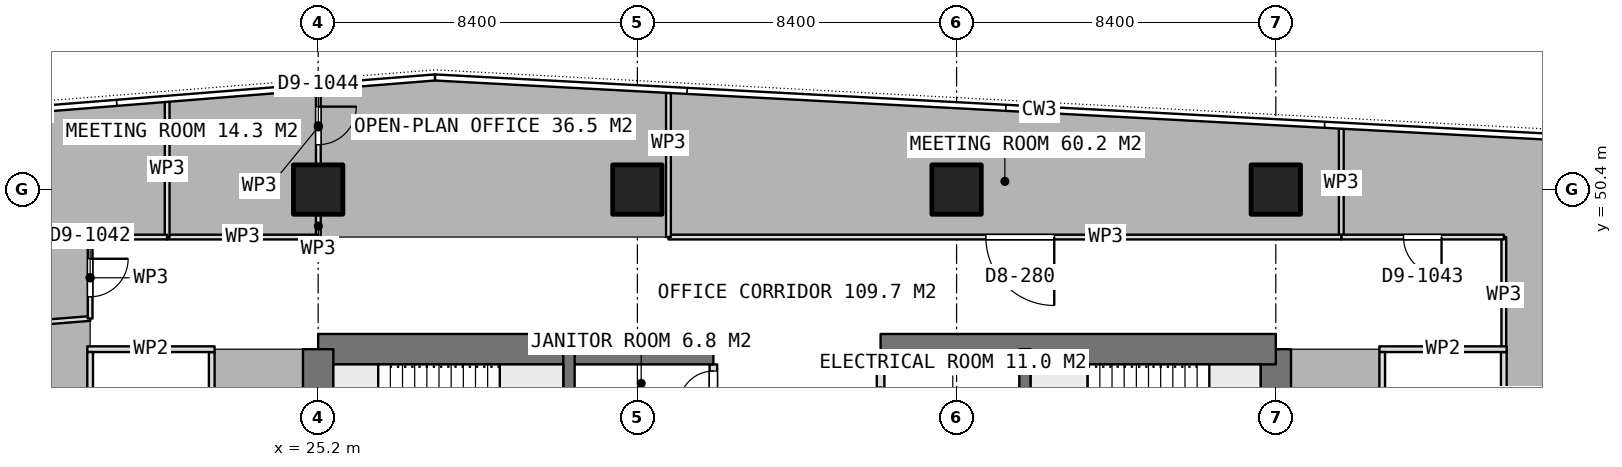
"""IFC4 building model, lengths in metres.
Left out: names, types, materials, properties, quantities, classifications, styles, units other than length and angle.
Written with IfcOpenShell. Run it as: python <this file> out.ifc"""

import sys

from ifc_helpers import new_model, si_unit, direction, frame, frame_2d, origin, origin_2d, place, context, subcontext, project, spatial, rectangle, extrude, element, fill, save


model = new_model("IFC4")
c1 = context("Model", 3, precision=1e-05, world=origin(), true_north=direction((0.0, 1.0)))
c2 = subcontext(c1, "Body", "Model", "MODEL_VIEW")
j1 = project(units=[si_unit("LENGTHUNIT", "METRE"), si_unit("PLANEANGLEUNIT", "RADIAN")], contexts=[c1])
p1 = place(None, origin())
s1 = spatial("IfcSite", under=j1, at=p1, CompositionType="ELEMENT")
p2 = place(p1, origin())
s2 = spatial("IfcBuilding", under=s1, at=p2, CompositionType="ELEMENT")
p3 = place(p2, frame((0.0, 0.0, 280.1)))
s3 = spatial("IfcBuildingStorey", under=s2, at=p3, CompositionType="ELEMENT", Elevation=280.1)
p4 = place(p3, frame((25.2, 46.2, 0.0), z_axis=(0.0, 0.0, 1.0), x_axis=(1.0, 0.0, 0.0)))
e1 = element("IfcWall", 1, at=p4, inside=s3, PredefinedType="SHEAR", context=c2, shape_type="SweptSolid", body=[
    extrude(rectangle(XDim=10.4, YDim=0.8, at=frame_2d((5.2, 0.0))), origin(), (0.0, 0.0, 1.0), 3.75),
])
p5 = place(p3, frame((40.0, 46.2, 0.0), z_axis=(0.0, 0.0, 1.0), x_axis=(1.0, 0.0, 0.0)))
e2 = element("IfcWall", 2, at=p5, inside=s3, PredefinedType="SHEAR", context=c2, shape_type="SweptSolid", body=[
    extrude(rectangle(XDim=10.4, YDim=0.8, at=frame_2d((5.2, 0.0))), origin(), (0.0, 0.0, 1.0), 3.75),
])
p6 = place(p3, frame((25.2, 21.0, 0.0), z_axis=(0.0, 0.0, 1.0), x_axis=(0.0, 1.0, 0.0)))
e3 = element("IfcWall", 3, at=p6, inside=s3, PredefinedType="SHEAR", context=c2, shape_type="SweptSolid", body=[
    extrude(rectangle(XDim=25.2, YDim=0.8, at=frame_2d((12.6, 0.0))), origin(), (0.0, 0.0, 1.0), 3.75),
])
p7 = place(p6, frame((7.8, 0.0, 0.0)))
e4 = element("IfcOpeningElement", 4, at=p7, cuts=e3, PredefinedType="OPENING", context=c2, shape_type="SweptSolid", body=[
    extrude(rectangle(XDim=1.2, YDim=2.1, at=frame_2d((0.6, 1.05))), frame((0.0, 0.41, 0.0), z_axis=(0.0, -1.0, 0.0), x_axis=(1.0, 0.0, 0.0)), (0.0, 0.0, 1.0), 0.82),
])
p8 = place(p6, frame((14.25, 0.0, 0.0)))
e5 = element("IfcOpeningElement", 5, at=p8, cuts=e3, PredefinedType="OPENING", context=c2, shape_type="SweptSolid", body=[
    extrude(rectangle(XDim=0.9, YDim=2.1, at=frame_2d((0.45, 1.05))), frame((0.0, 0.41, 0.0), z_axis=(0.0, -1.0, 0.0), x_axis=(1.0, 0.0, 0.0)), (0.0, 0.0, 1.0), 0.82),
])
p9 = place(p6, frame((16.85, 0.0, 0.0)))
e6 = element("IfcOpeningElement", 6, at=p9, cuts=e3, PredefinedType="OPENING", context=c2, shape_type="SweptSolid", body=[
    extrude(rectangle(XDim=0.9, YDim=2.1, at=frame_2d((0.45, 1.05))), frame((0.0, 0.41, 0.0), z_axis=(0.0, -1.0, 0.0), x_axis=(1.0, 0.0, 0.0)), (0.0, 0.0, 1.0), 0.82),
])
p10 = place(p6, frame((18.95, 0.0, 0.0)))
e7 = element("IfcOpeningElement", 7, at=p10, cuts=e3, PredefinedType="OPENING", context=c2, shape_type="SweptSolid", body=[
    extrude(rectangle(XDim=1.2, YDim=2.1, at=frame_2d((0.6, 1.05))), frame((0.0, 0.41, 0.0), z_axis=(0.0, -1.0, 0.0), x_axis=(1.0, 0.0, 0.0)), (0.0, 0.0, 1.0), 0.82),
])
p11 = place(p3, frame((50.4, 21.0, 0.0), z_axis=(0.0, 0.0, 1.0), x_axis=(0.0, 1.0, 0.0)))
e8 = element("IfcWall", 8, at=p11, inside=s3, PredefinedType="SHEAR", context=c2, shape_type="SweptSolid", body=[
    extrude(rectangle(XDim=25.2, YDim=0.8, at=frame_2d((12.6, 0.0))), origin(), (0.0, 0.0, 1.0), 3.75),
])
p12 = place(p11, frame((16.2, 0.0, 0.0)))
e9 = element("IfcOpeningElement", 9, at=p12, cuts=e8, PredefinedType="OPENING", context=c2, shape_type="SweptSolid", body=[
    extrude(rectangle(XDim=1.2, YDim=2.1, at=frame_2d((0.6, 1.05))), frame((0.0, 0.41, 0.0), z_axis=(0.0, -1.0, 0.0), x_axis=(1.0, 0.0, 0.0)), (0.0, 0.0, 1.0), 0.82),
])
p13 = place(p11, frame((10.05, 0.0, 0.0)))
e10 = element("IfcOpeningElement", 10, at=p13, cuts=e8, PredefinedType="OPENING", context=c2, shape_type="SweptSolid", body=[
    extrude(rectangle(XDim=0.9, YDim=2.1, at=frame_2d((0.45, 1.05))), frame((0.0, 0.41, 0.0), z_axis=(0.0, -1.0, 0.0), x_axis=(1.0, 0.0, 0.0)), (0.0, 0.0, 1.0), 0.82),
])
p14 = place(p11, frame((7.45, 0.0, 0.0)))
e11 = element("IfcOpeningElement", 11, at=p14, cuts=e8, PredefinedType="OPENING", context=c2, shape_type="SweptSolid", body=[
    extrude(rectangle(XDim=0.9, YDim=2.1, at=frame_2d((0.45, 1.05))), frame((0.0, 0.41, 0.0), z_axis=(0.0, -1.0, 0.0), x_axis=(1.0, 0.0, 0.0)), (0.0, 0.0, 1.0), 0.82),
])
p15 = place(p11, frame((0.6, 0.0, 0.0)))
e12 = element("IfcOpeningElement", 12, at=p15, cuts=e8, PredefinedType="OPENING", context=c2, shape_type="SweptSolid", body=[
    extrude(rectangle(XDim=1.2, YDim=2.1, at=frame_2d((0.6, 1.05))), frame((0.0, 0.41, 0.0), z_axis=(0.0, -1.0, 0.0), x_axis=(1.0, 0.0, 0.0)), (0.0, 0.0, 1.0), 0.82),
])
for number, where, z_axis, x_axis in (
    (13, (31.8, 21.0, 0.0), (0.0, 0.0, 1.0), (0.0, 1.0, 0.0)),
    (14, (43.8, 21.0, 0.0), (0.0, 0.0, 1.0), (0.0, 1.0, 0.0)),
):
    element("IfcWall", number, at=place(p3, frame(where, z_axis=z_axis, x_axis=x_axis)), inside=s3, PredefinedType="SHEAR", context=c2, shape_type="SweptSolid", body=[
        extrude(rectangle(XDim=25.2, YDim=0.3, at=frame_2d((12.6, 0.0))), origin(), (0.0, 0.0, 1.0), 3.75),
    ])
for number, where, z_axis, x_axis in (
    (15, (25.2, 50.4, 0.0), (0.0, 0.0, 1.0), (1.0, 0.0, 0.0)),
    (16, (33.6, 50.4, 0.0), (0.0, 0.0, 1.0), (1.0, 0.0, 0.0)),
    (17, (42.0, 50.4, 0.0), (0.0, 0.0, 1.0), (1.0, 0.0, 0.0)),
    (18, (50.4, 50.4, 0.0), (0.0, 0.0, 1.0), (1.0, 0.0, 0.0)),
):
    element("IfcColumn", number, at=place(p3, frame(where, z_axis=z_axis, x_axis=x_axis)), inside=s3, PredefinedType="COLUMN", context=c2, shape_type="SweptSolid", body=[
        extrude(rectangle(XDim=1.3, YDim=1.3, at=origin_2d()), origin(), (0.0, 0.0, 1.0), 3.75),
    ])
p16 = place(p3, frame((40.0, 41.55, 0.0), z_axis=(0.0, 0.0, 1.0), x_axis=(0.0, 1.0, 0.0)))
e19 = element("IfcWall", 19, at=p16, inside=s3, PredefinedType="PARTITIONING", context=c2, shape_type="SweptSolid", body=[
    extrude(rectangle(XDim=4.25, YDim=0.2, at=frame_2d((2.125, 0.0))), origin(), (0.0, 0.0, 1.0), 3.5),
])
p17 = place(p16, frame((2.75, 0.0, 0.0)))
e20 = element("IfcOpeningElement", 20, at=p17, cuts=e19, PredefinedType="OPENING", context=c2, shape_type="SweptSolid", body=[
    extrude(rectangle(XDim=0.9, YDim=2.1, at=frame_2d((0.45, 1.05))), frame((0.0, 0.11, 0.0), z_axis=(0.0, -1.0, 0.0), x_axis=(1.0, 0.0, 0.0)), (0.0, 0.0, 1.0), 0.22),
])
p18 = place(p16, frame((0.35, 0.0, 0.0)))
e21 = element("IfcOpeningElement", 21, at=p18, cuts=e19, PredefinedType="OPENING", context=c2, shape_type="SweptSolid", body=[
    extrude(rectangle(XDim=0.9, YDim=2.1, at=frame_2d((0.45, 1.05))), frame((0.0, 0.11, 0.0), z_axis=(0.0, -1.0, 0.0), x_axis=(1.0, 0.0, 0.0)), (0.0, 0.0, 1.0), 0.22),
])
p19 = place(p3, frame((35.6, 41.55, 0.0), z_axis=(0.0, 0.0, 1.0), x_axis=(0.0, 1.0, 0.0)))
e22 = element("IfcWall", 22, at=p19, inside=s3, PredefinedType="PARTITIONING", context=c2, shape_type="SweptSolid", body=[
    extrude(rectangle(XDim=4.25, YDim=0.2, at=frame_2d((2.125, 0.0))), origin(), (0.0, 0.0, 1.0), 3.5),
])
p20 = place(p19, frame((3.175, 0.0, 0.0)))
e23 = element("IfcOpeningElement", 23, at=p20, cuts=e22, PredefinedType="OPENING", context=c2, shape_type="SweptSolid", body=[
    extrude(rectangle(XDim=0.9, YDim=2.1, at=frame_2d((0.45, 1.05))), frame((0.0, 0.11, 0.0), z_axis=(0.0, -1.0, 0.0), x_axis=(1.0, 0.0, 0.0)), (0.0, 0.0, 1.0), 0.22),
])
p21 = place(p19, frame((0.8, 0.0, 0.0)))
e24 = element("IfcOpeningElement", 24, at=p21, cuts=e22, PredefinedType="OPENING", context=c2, shape_type="SweptSolid", body=[
    extrude(rectangle(XDim=1.1, YDim=2.1, at=frame_2d((0.55, 1.05))), frame((0.0, 0.11, 0.0), z_axis=(0.0, -1.0, 0.0), x_axis=(1.0, 0.0, 0.0)), (0.0, 0.0, 1.0), 0.22),
])
p22 = place(p3, frame((53.125, 46.2, 0.0), z_axis=(0.0, 0.0, 1.0), x_axis=(1.0, 0.0, 0.0)))
e25 = element("IfcWall", 25, at=p22, inside=s3, PredefinedType="PARTITIONING", context=c2, shape_type="SweptSolid", body=[
    extrude(rectangle(XDim=3.35, YDim=0.15, at=frame_2d((1.675, 0.0))), origin(), (0.0, 0.0, 1.0), 3.5),
])
p23 = place(p3, frame((53.2, 39.275, 0.0), z_axis=(0.0, 0.0, 1.0), x_axis=(0.0, 1.0, 0.0)))
e26 = element("IfcWall", 26, at=p23, inside=s3, PredefinedType="PARTITIONING", context=c2, shape_type="SweptSolid", body=[
    extrude(rectangle(XDim=6.85, YDim=0.15, at=frame_2d((3.425, 0.0))), origin(), (0.0, 0.0, 1.0), 3.5),
])
p24 = place(p23, frame((2.925, 0.0, 0.0)))
e27 = element("IfcOpeningElement", 27, at=p24, cuts=e26, PredefinedType="OPENING", context=c2, shape_type="SweptSolid", body=[
    extrude(rectangle(XDim=1.0, YDim=2.1, at=frame_2d((0.5, 1.05))), frame((0.0, 0.085, 0.0), z_axis=(0.0, -1.0, 0.0), x_axis=(1.0, 0.0, 0.0)), (0.0, 0.0, 1.0), 0.17),
])
p25 = place(p3, frame((56.4, 39.275, 0.0), z_axis=(0.0, 0.0, 1.0), x_axis=(0.0, 1.0, 0.0)))
e28 = element("IfcWall", 28, at=p25, inside=s3, PredefinedType="PARTITIONING", context=c2, shape_type="SweptSolid", body=[
    extrude(rectangle(XDim=6.85, YDim=0.15, at=frame_2d((3.425, 0.0))), origin(), (0.0, 0.0, 1.0), 3.5),
])
p26 = place(p3, frame((19.125, 46.2, 0.0), z_axis=(0.0, 0.0, 1.0), x_axis=(1.0, 0.0, 0.0)))
e29 = element("IfcWall", 29, at=p26, inside=s3, PredefinedType="PARTITIONING", context=c2, shape_type="SweptSolid", body=[
    extrude(rectangle(XDim=3.35, YDim=0.15, at=frame_2d((1.675, 0.0))), origin(), (0.0, 0.0, 1.0), 3.5),
])
p27 = place(p3, frame((19.2, 39.275, 0.0), z_axis=(0.0, 0.0, 1.0), x_axis=(0.0, 1.0, 0.0)))
e30 = element("IfcWall", 30, at=p27, inside=s3, PredefinedType="PARTITIONING", context=c2, shape_type="SweptSolid", body=[
    extrude(rectangle(XDim=6.85, YDim=0.15, at=frame_2d((3.425, 0.0))), origin(), (0.0, 0.0, 1.0), 3.5),
])
p28 = place(p3, frame((22.4, 39.275, 0.0), z_axis=(0.0, 0.0, 1.0), x_axis=(0.0, 1.0, 0.0)))
e31 = element("IfcWall", 31, at=p28, inside=s3, PredefinedType="PARTITIONING", context=c2, shape_type="SweptSolid", body=[
    extrude(rectangle(XDim=6.85, YDim=0.15, at=frame_2d((3.425, 0.0))), origin(), (0.0, 0.0, 1.0), 3.5),
])
p29 = place(p28, frame((2.925, 0.0, 0.0)))
e32 = element("IfcOpeningElement", 32, at=p29, cuts=e31, PredefinedType="OPENING", context=c2, shape_type="SweptSolid", body=[
    extrude(rectangle(XDim=1.0, YDim=2.1, at=frame_2d((0.5, 1.05))), frame((0.0, 0.085, 0.0), z_axis=(0.0, -1.0, 0.0), x_axis=(1.0, 0.0, 0.0)), (0.0, 0.0, 1.0), 0.17),
])
p30 = place(p3, frame((52.123, 49.15, 0.0), z_axis=(0.0, 0.0, 1.0), x_axis=(0.0, 1.0, 0.0)))
e33 = element("IfcWall", 33, at=p30, inside=s3, PredefinedType="PARTITIONING", context=c2, shape_type="SweptSolid", body=[
    extrude(rectangle(XDim=2.852, YDim=0.125, at=frame_2d((1.426, 0.0))), origin(), (0.0, 0.0, 1.0), 3.5),
])
p31 = place(p3, frame((56.4, 46.125, 0.0), z_axis=(0.0, 0.0, 1.0), x_axis=(0.0, 1.0, 0.0)))
e34 = element("IfcWall", 34, at=p31, inside=s3, PredefinedType="PARTITIONING", context=c2, shape_type="SweptSolid", body=[
    extrude(rectangle(XDim=3.025, YDim=0.125, at=frame_2d((1.512, 0.0))), origin(), (0.0, 0.0, 1.0), 3.5),
])
p32 = place(p3, frame((56.4, 49.15, 0.0), z_axis=(0.0, 0.0, 1.0), x_axis=(-1.0, 0.0, 0.0)))
e35 = element("IfcWall", 35, at=p32, inside=s3, PredefinedType="PARTITIONING", context=c2, shape_type="SweptSolid", body=[
    extrude(rectangle(XDim=4.277, YDim=0.125, at=frame_2d((2.138, 0.0))), origin(), (0.0, 0.0, 1.0), 3.5),
])
p33 = place(p32, frame((1.639, 0.0, 0.0)))
e36 = element("IfcOpeningElement", 36, at=p33, cuts=e35, PredefinedType="OPENING", context=c2, shape_type="SweptSolid", body=[
    extrude(rectangle(XDim=1.0, YDim=2.1, at=frame_2d((0.5, 1.05))), frame((0.0, 0.073, 0.0), z_axis=(0.0, -1.0, 0.0), x_axis=(1.0, 0.0, 0.0)), (0.0, 0.0, 1.0), 0.145),
])
p34 = place(p3, frame((52.123, 49.15, 0.0), z_axis=(0.0, 0.0, 1.0), x_axis=(-1.0, 0.0, 0.0)))
e37 = element("IfcWall", 37, at=p34, inside=s3, PredefinedType="PARTITIONING", context=c2, shape_type="SweptSolid", body=[
    extrude(rectangle(XDim=17.705, YDim=0.125, at=frame_2d((8.853, 0.0))), origin(), (0.0, 0.0, 1.0), 3.5),
])
p35 = place(p34, frame((7.553, 0.0, 0.0)))
e38 = element("IfcOpeningElement", 38, at=p35, cuts=e37, PredefinedType="OPENING", context=c2, shape_type="SweptSolid", body=[
    extrude(rectangle(XDim=1.8, YDim=2.1, at=frame_2d((0.9, 1.05))), frame((0.0, 0.073, 0.0), z_axis=(0.0, -1.0, 0.0), x_axis=(1.0, 0.0, 0.0)), (0.0, 0.0, 1.0), 0.145),
])
p36 = place(p3, frame((34.418, 49.15, 0.0), z_axis=(0.0, 0.0, 1.0), x_axis=(0.0, 1.0, 0.0)))
e39 = element("IfcWall", 39, at=p36, inside=s3, PredefinedType="PARTITIONING", context=c2, shape_type="SweptSolid", body=[
    extrude(rectangle(XDim=3.793, YDim=0.125, at=frame_2d((1.896, 0.0))), origin(), (0.0, 0.0, 1.0), 3.5),
])
p37 = place(p3, frame((25.205, 53.025, 0.0), z_axis=(0.0, 0.0, 1.0), x_axis=(0.0, -1.0, 0.0)))
e40 = element("IfcWall", 40, at=p37, inside=s3, PredefinedType="PARTITIONING", context=c2, shape_type="SweptSolid", body=[
    extrude(rectangle(XDim=1.955, YDim=0.125, at=frame_2d((0.978, 0.0))), origin(), (0.0, 0.0, 1.0), 3.5),
])
p38 = place(p37, frame((0.443, 0.0, 0.0)))
e41 = element("IfcOpeningElement", 41, at=p38, cuts=e40, PredefinedType="OPENING", context=c2, shape_type="SweptSolid", body=[
    extrude(rectangle(XDim=1.0, YDim=2.1, at=frame_2d((0.5, 1.05))), frame((0.0, 0.073, 0.0), z_axis=(0.0, -1.0, 0.0), x_axis=(1.0, 0.0, 0.0)), (0.0, 0.0, 1.0), 0.145),
])
p39 = place(p3, frame((25.205, 49.73, 0.0), z_axis=(0.0, 0.0, 1.0), x_axis=(0.0, -1.0, 0.0)))
e42 = element("IfcWall", 42, at=p39, inside=s3, PredefinedType="PARTITIONING", context=c2, shape_type="SweptSolid", body=[
    extrude(rectangle(XDim=0.58, YDim=0.125, at=frame_2d((0.29, 0.0))), origin(), (0.0, 0.0, 1.0), 3.5),
])
p40 = place(p3, frame((25.205, 49.15, 0.0), z_axis=(0.0, 0.0, 1.0), x_axis=(-1.0, 0.0, 0.0)))
e43 = element("IfcWall", 43, at=p40, inside=s3, PredefinedType="PARTITIONING", context=c2, shape_type="SweptSolid", body=[
    extrude(rectangle(XDim=3.978, YDim=0.125, at=frame_2d((1.989, 0.0))), origin(), (0.0, 0.0, 1.0), 3.5),
])
p41 = place(p3, frame((21.227, 49.15, 0.0), z_axis=(0.0, 0.0, 1.0), x_axis=(0.0, 1.0, 0.0)))
e44 = element("IfcWall", 44, at=p41, inside=s3, PredefinedType="PARTITIONING", context=c2, shape_type="SweptSolid", body=[
    extrude(rectangle(XDim=3.558, YDim=0.125, at=frame_2d((1.779, 0.0))), origin(), (0.0, 0.0, 1.0), 3.5),
])
p42 = place(p3, frame((19.2, 47.008, 0.0), z_axis=(0.0, 0.0, 1.0), x_axis=(-0.996842300725, -0.079406721921, 0.0)))
e45 = element("IfcWall", 45, at=p42, inside=s3, PredefinedType="PARTITIONING", context=c2, shape_type="SweptSolid", body=[
    extrude(rectangle(XDim=6.02, YDim=0.125, at=frame_2d((3.01, 0.0))), origin(), (0.0, 0.0, 1.0), 3.5),
])
p43 = place(p3, frame((21.226, 49.15, 0.0), z_axis=(0.0, 0.0, 1.0), x_axis=(-1.0, 0.0, 0.0)))
e46 = element("IfcWall", 46, at=p43, inside=s3, PredefinedType="PARTITIONING", context=c2, shape_type="SweptSolid", body=[
    extrude(rectangle(XDim=2.026, YDim=0.125, at=frame_2d((1.013, 0.0))), origin(), (0.0, 0.0, 1.0), 3.5),
])
p44 = place(p3, frame((19.2, 49.15, 0.0), z_axis=(0.0, 0.0, 1.0), x_axis=(0.0, -1.0, 0.0)))
e47 = element("IfcWall", 47, at=p44, inside=s3, PredefinedType="PARTITIONING", context=c2, shape_type="SweptSolid", body=[
    extrude(rectangle(XDim=2.142, YDim=0.125, at=frame_2d((1.071, 0.0))), origin(), (0.0, 0.0, 1.0), 3.5),
])
p45 = place(p44, frame((0.571, 0.0, 0.0)))
e48 = element("IfcOpeningElement", 48, at=p45, cuts=e47, PredefinedType="OPENING", context=c2, shape_type="SweptSolid", body=[
    extrude(rectangle(XDim=1.0, YDim=2.1, at=frame_2d((0.5, 1.05))), frame((0.0, 0.073, 0.0), z_axis=(0.0, -1.0, 0.0), x_axis=(1.0, 0.0, 0.0)), (0.0, 0.0, 1.0), 0.145),
])
p46 = place(p20, origin())
e49 = element("IfcDoor", 49, at=p46, inside=s3, OperationType="SINGLE_SWING_LEFT", PredefinedType="DOOR", context=c2, shape_type="SweptSolid", body=[
    extrude(rectangle(XDim=0.9, YDim=2.1, at=frame_2d((0.45, 1.05))), frame((0.0, 0.025, 0.0), z_axis=(0.0, -1.0, 0.0), x_axis=(1.0, 0.0, 0.0)), (0.0, 0.0, 1.0), 0.05),
])
fill(e23, e49)
p47 = place(p33, origin())
e50 = element("IfcDoor", 50, at=p47, inside=s3, OperationType="SINGLE_SWING_LEFT", PredefinedType="DOOR", context=c2, shape_type="SweptSolid", body=[
    extrude(rectangle(XDim=1.0, YDim=2.1, at=frame_2d((0.5, 1.05))), frame((0.0, 0.025, 0.0), z_axis=(0.0, -1.0, 0.0), x_axis=(1.0, 0.0, 0.0)), (0.0, 0.0, 1.0), 0.05),
])
fill(e36, e50)
p48 = place(p35, origin())
e51 = element("IfcDoor", 51, at=p48, inside=s3, OperationType="DOUBLE_DOOR_SINGLE_SWING", PredefinedType="DOOR", context=c2, shape_type="SweptSolid", body=[
    extrude(rectangle(XDim=1.8, YDim=2.1, at=frame_2d((0.9, 1.05))), frame((0.0, 0.025, 0.0), z_axis=(0.0, -1.0, 0.0), x_axis=(1.0, 0.0, 0.0)), (0.0, 0.0, 1.0), 0.05),
])
fill(e38, e51)
p49 = place(p38, origin())
e52 = element("IfcDoor", 52, at=p49, inside=s3, OperationType="SINGLE_SWING_LEFT", PredefinedType="DOOR", context=c2, shape_type="SweptSolid", body=[
    extrude(rectangle(XDim=1.0, YDim=2.1, at=frame_2d((0.5, 1.05))), frame((0.0, 0.025, 0.0), z_axis=(0.0, -1.0, 0.0), x_axis=(1.0, 0.0, 0.0)), (0.0, 0.0, 1.0), 0.05),
])
fill(e41, e52)
p50 = place(p45, origin())
e53 = element("IfcDoor", 53, at=p50, inside=s3, OperationType="SINGLE_SWING_LEFT", PredefinedType="DOOR", context=c2, shape_type="SweptSolid", body=[
    extrude(rectangle(XDim=1.0, YDim=2.1, at=frame_2d((0.5, 1.05))), frame((0.0, 0.025, 0.0), z_axis=(0.0, -1.0, 0.0), x_axis=(1.0, 0.0, 0.0)), (0.0, 0.0, 1.0), 0.05),
])
fill(e48, e53)
save(model, sys.argv[1])
